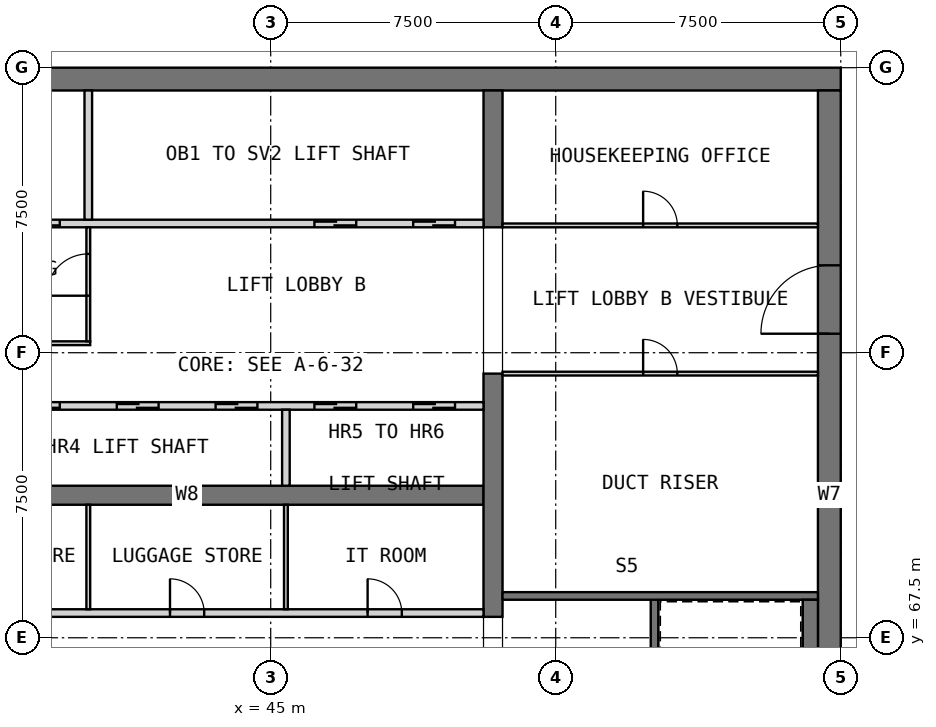
"""IFC4 building model, lengths in metres.
Left out: names, types, materials, properties, quantities, classifications, styles, units other than length and angle.
Written with IfcOpenShell. Run it as: python <this file> out.ifc"""

import sys

from ifc_helpers import new_model, si_unit, direction, frame, frame_2d, origin, place, context, subcontext, project, spatial, rectangle, extrude, element, fill, save


model = new_model("IFC4")
c1 = context("Model", 3, precision=1e-05, world=origin(), true_north=direction((0.0, 1.0)))
c2 = subcontext(c1, "Body", "Model", "MODEL_VIEW")
j1 = project(units=[si_unit("LENGTHUNIT", "METRE"), si_unit("PLANEANGLEUNIT", "RADIAN")], contexts=[c1])
p1 = place(None, origin())
s1 = spatial("IfcSite", under=j1, at=p1, CompositionType="ELEMENT")
p2 = place(p1, origin())
s2 = spatial("IfcBuilding", under=s1, at=p2, CompositionType="ELEMENT")
p3 = place(p2, frame((0.0, 0.0, 254.7)))
s3 = spatial("IfcBuildingStorey", under=s2, at=p3, CompositionType="ELEMENT", Elevation=254.7)
p4 = place(p3, frame((30.0, 82.2, 0.0), z_axis=(0.0, 0.0, 1.0), x_axis=(1.0, 0.0, 0.0)))
e1 = element("IfcWall", 1, at=p4, inside=s3, PredefinedType="SHEAR", context=c2, shape_type="SweptSolid", body=[
    extrude(rectangle(XDim=30.0, YDim=0.6, at=frame_2d((15.0, 0.0))), origin(), (0.0, 0.0, 1.0), 3.5),
])
p5 = place(p3, frame((59.7, 60.6, 0.0), z_axis=(0.0, 0.0, 1.0), x_axis=(0.0, 1.0, 0.0)))
e2 = element("IfcWall", 2, at=p5, inside=s3, PredefinedType="SHEAR", context=c2, shape_type="SweptSolid", body=[
    extrude(rectangle(XDim=21.3, YDim=0.6, at=frame_2d((10.65, 0.0))), origin(), (0.0, 0.0, 1.0), 3.5),
])
p6 = place(p5, frame((14.9, 0.0, 0.0)))
e3 = element("IfcOpeningElement", 3, at=p6, cuts=e2, PredefinedType="OPENING", context=c2, shape_type="SweptSolid", body=[
    extrude(rectangle(XDim=1.8, YDim=2.1, at=frame_2d((0.9, 1.05))), frame((0.0, 0.31, 0.0), z_axis=(0.0, -1.0, 0.0), x_axis=(1.0, 0.0, 0.0)), (0.0, 0.0, 1.0), 0.62),
])
p7 = place(p3, frame((35.0, 71.25, 0.0), z_axis=(0.0, 0.0, 1.0), x_axis=(1.0, 0.0, 0.0)))
e4 = element("IfcWall", 4, at=p7, inside=s3, PredefinedType="SHEAR", context=c2, shape_type="SweptSolid", body=[
    extrude(rectangle(XDim=15.6, YDim=0.5, at=frame_2d((7.8, 0.0))), origin(), (0.0, 0.0, 1.0), 3.5),
])
p8 = place(p3, frame((50.85, 68.05, 0.0), z_axis=(0.0, 0.0, 1.0), x_axis=(0.0, 1.0, 0.0)))
e5 = element("IfcWall", 5, at=p8, inside=s3, PredefinedType="SHEAR", context=c2, shape_type="SweptSolid", body=[
    extrude(rectangle(XDim=6.4, YDim=0.5, at=frame_2d((3.2, 0.0))), origin(), (0.0, 0.0, 1.0), 3.5),
])
p9 = place(p3, frame((50.85, 78.3, 0.0), z_axis=(0.0, 0.0, 1.0), x_axis=(0.0, 1.0, 0.0)))
e6 = element("IfcWall", 6, at=p9, inside=s3, PredefinedType="SHEAR", context=c2, shape_type="SweptSolid", body=[
    extrude(rectangle(XDim=3.6, YDim=0.5, at=frame_2d((1.8, 0.0))), origin(), (0.0, 0.0, 1.0), 3.5),
])
p10 = place(p3, frame((35.0, 68.15, 0.0), z_axis=(0.0, 0.0, 1.0), x_axis=(1.0, 0.0, 0.0)))
e7 = element("IfcWall", 7, at=p10, inside=s3, PredefinedType="PARTITIONING", context=c2, shape_type="SweptSolid", body=[
    extrude(rectangle(XDim=15.6, YDim=0.2, at=frame_2d((7.8, 0.0))), origin(), (0.0, 0.0, 1.0), 3.09),
])
p11 = place(p10, frame((2.15, 0.0, 0.0)))
e8 = element("IfcOpeningElement", 8, at=p11, cuts=e7, PredefinedType="OPENING", context=c2, shape_type="SweptSolid", body=[
    extrude(rectangle(XDim=0.9, YDim=2.1, at=frame_2d((0.45, 1.05))), frame((0.0, 0.11, 0.0), z_axis=(0.0, -1.0, 0.0), x_axis=(1.0, 0.0, 0.0)), (0.0, 0.0, 1.0), 0.22),
])
p12 = place(p10, frame((7.35, 0.0, 0.0)))
e9 = element("IfcOpeningElement", 9, at=p12, cuts=e7, PredefinedType="OPENING", context=c2, shape_type="SweptSolid", body=[
    extrude(rectangle(XDim=0.9, YDim=2.1, at=frame_2d((0.45, 1.05))), frame((0.0, 0.11, 0.0), z_axis=(0.0, -1.0, 0.0), x_axis=(1.0, 0.0, 0.0)), (0.0, 0.0, 1.0), 0.22),
])
p13 = place(p10, frame((12.55, 0.0, 0.0)))
e10 = element("IfcOpeningElement", 10, at=p13, cuts=e7, PredefinedType="OPENING", context=c2, shape_type="SweptSolid", body=[
    extrude(rectangle(XDim=0.9, YDim=2.1, at=frame_2d((0.45, 1.05))), frame((0.0, 0.11, 0.0), z_axis=(0.0, -1.0, 0.0), x_axis=(1.0, 0.0, 0.0)), (0.0, 0.0, 1.0), 0.22),
])
for number, where, z_axis, x_axis in (
    (11, (40.2, 68.25, 0.0), (0.0, 0.0, 1.0), (0.0, 1.0, 0.0)),
    (12, (45.4, 68.25, 0.0), (0.0, 0.0, 1.0), (0.0, 1.0, 0.0)),
):
    element("IfcWall", number, at=place(p3, frame(where, z_axis=z_axis, x_axis=x_axis)), inside=s3, PredefinedType="PARTITIONING", context=c2, shape_type="SweptSolid", body=[
        extrude(rectangle(XDim=2.75, YDim=0.1, at=frame_2d((1.375, 0.0))), origin(), (0.0, 0.0, 1.0), 3.09),
    ])
p14 = place(p3, frame((35.0, 73.6, 0.0), z_axis=(0.0, 0.0, 1.0), x_axis=(1.0, 0.0, 0.0)))
e13 = element("IfcWall", 13, at=p14, inside=s3, PredefinedType="SOLIDWALL", context=c2, shape_type="SweptSolid", body=[
    extrude(rectangle(XDim=15.6, YDim=0.2, at=frame_2d((7.8, 0.0))), origin(), (0.0, 0.0, 1.0), 3.5),
])
p15 = place(p14, frame((0.75, 0.0, 0.0)))
e14 = element("IfcOpeningElement", 14, at=p15, cuts=e13, PredefinedType="OPENING", context=c2, shape_type="SweptSolid", body=[
    extrude(rectangle(XDim=1.1, YDim=2.1, at=frame_2d((0.55, 1.05))), frame((0.0, 0.11, 0.0), z_axis=(0.0, -1.0, 0.0), x_axis=(1.0, 0.0, 0.0)), (0.0, 0.0, 1.0), 0.22),
])
p16 = place(p14, frame((3.35, 0.0, 0.0)))
e15 = element("IfcOpeningElement", 15, at=p16, cuts=e13, PredefinedType="OPENING", context=c2, shape_type="SweptSolid", body=[
    extrude(rectangle(XDim=1.1, YDim=2.1, at=frame_2d((0.55, 1.05))), frame((0.0, 0.11, 0.0), z_axis=(0.0, -1.0, 0.0), x_axis=(1.0, 0.0, 0.0)), (0.0, 0.0, 1.0), 0.22),
])
p17 = place(p14, frame((5.95, 0.0, 0.0)))
e16 = element("IfcOpeningElement", 16, at=p17, cuts=e13, PredefinedType="OPENING", context=c2, shape_type="SweptSolid", body=[
    extrude(rectangle(XDim=1.1, YDim=2.1, at=frame_2d((0.55, 1.05))), frame((0.0, 0.11, 0.0), z_axis=(0.0, -1.0, 0.0), x_axis=(1.0, 0.0, 0.0)), (0.0, 0.0, 1.0), 0.22),
])
p18 = place(p14, frame((8.55, 0.0, 0.0)))
e17 = element("IfcOpeningElement", 17, at=p18, cuts=e13, PredefinedType="OPENING", context=c2, shape_type="SweptSolid", body=[
    extrude(rectangle(XDim=1.1, YDim=2.1, at=frame_2d((0.55, 1.05))), frame((0.0, 0.11, 0.0), z_axis=(0.0, -1.0, 0.0), x_axis=(1.0, 0.0, 0.0)), (0.0, 0.0, 1.0), 0.22),
])
p19 = place(p14, frame((11.15, 0.0, 0.0)))
e18 = element("IfcOpeningElement", 18, at=p19, cuts=e13, PredefinedType="OPENING", context=c2, shape_type="SweptSolid", body=[
    extrude(rectangle(XDim=1.1, YDim=2.1, at=frame_2d((0.55, 1.05))), frame((0.0, 0.11, 0.0), z_axis=(0.0, -1.0, 0.0), x_axis=(1.0, 0.0, 0.0)), (0.0, 0.0, 1.0), 0.22),
])
p20 = place(p14, frame((13.75, 0.0, 0.0)))
e19 = element("IfcOpeningElement", 19, at=p20, cuts=e13, PredefinedType="OPENING", context=c2, shape_type="SweptSolid", body=[
    extrude(rectangle(XDim=1.1, YDim=2.1, at=frame_2d((0.55, 1.05))), frame((0.0, 0.11, 0.0), z_axis=(0.0, -1.0, 0.0), x_axis=(1.0, 0.0, 0.0)), (0.0, 0.0, 1.0), 0.22),
])
p21 = place(p3, frame((45.4, 71.5, 0.0), z_axis=(0.0, 0.0, 1.0), x_axis=(0.0, 1.0, 0.0)))
e20 = element("IfcWall", 20, at=p21, inside=s3, PredefinedType="SOLIDWALL", context=c2, shape_type="SweptSolid", body=[
    extrude(rectangle(XDim=2.0, YDim=0.2, at=frame_2d((1.0, 0.0))), origin(), (0.0, 0.0, 1.0), 3.5),
])
p22 = place(p3, frame((35.0, 78.4, 0.0), z_axis=(0.0, 0.0, 1.0), x_axis=(1.0, 0.0, 0.0)))
e21 = element("IfcWall", 21, at=p22, inside=s3, PredefinedType="SOLIDWALL", context=c2, shape_type="SweptSolid", body=[
    extrude(rectangle(XDim=15.6, YDim=0.2, at=frame_2d((7.8, 0.0))), origin(), (0.0, 0.0, 1.0), 3.5),
])
p23 = place(p22, frame((0.75, 0.0, 0.0)))
e22 = element("IfcOpeningElement", 22, at=p23, cuts=e21, PredefinedType="OPENING", context=c2, shape_type="SweptSolid", body=[
    extrude(rectangle(XDim=1.1, YDim=2.1, at=frame_2d((0.55, 1.05))), frame((0.0, 0.11, 0.0), z_axis=(0.0, -1.0, 0.0), x_axis=(1.0, 0.0, 0.0)), (0.0, 0.0, 1.0), 0.22),
])
p24 = place(p22, frame((3.35, 0.0, 0.0)))
e23 = element("IfcOpeningElement", 23, at=p24, cuts=e21, PredefinedType="OPENING", context=c2, shape_type="SweptSolid", body=[
    extrude(rectangle(XDim=1.1, YDim=2.1, at=frame_2d((0.55, 1.05))), frame((0.0, 0.11, 0.0), z_axis=(0.0, -1.0, 0.0), x_axis=(1.0, 0.0, 0.0)), (0.0, 0.0, 1.0), 0.22),
])
p25 = place(p22, frame((11.15, 0.0, 0.0)))
e24 = element("IfcOpeningElement", 24, at=p25, cuts=e21, PredefinedType="OPENING", context=c2, shape_type="SweptSolid", body=[
    extrude(rectangle(XDim=1.1, YDim=2.1, at=frame_2d((0.55, 1.05))), frame((0.0, 0.11, 0.0), z_axis=(0.0, -1.0, 0.0), x_axis=(1.0, 0.0, 0.0)), (0.0, 0.0, 1.0), 0.22),
])
p26 = place(p22, frame((13.75, 0.0, 0.0)))
e25 = element("IfcOpeningElement", 25, at=p26, cuts=e21, PredefinedType="OPENING", context=c2, shape_type="SweptSolid", body=[
    extrude(rectangle(XDim=1.1, YDim=2.1, at=frame_2d((0.55, 1.05))), frame((0.0, 0.11, 0.0), z_axis=(0.0, -1.0, 0.0), x_axis=(1.0, 0.0, 0.0)), (0.0, 0.0, 1.0), 0.22),
])
p27 = place(p3, frame((40.2, 78.5, 0.0), z_axis=(0.0, 0.0, 1.0), x_axis=(0.0, 1.0, 0.0)))
e26 = element("IfcWall", 26, at=p27, inside=s3, PredefinedType="SOLIDWALL", context=c2, shape_type="SweptSolid", body=[
    extrude(rectangle(XDim=3.4, YDim=0.2, at=frame_2d((1.7, 0.0))), origin(), (0.0, 0.0, 1.0), 3.5),
])
p28 = place(p3, frame((35.0, 75.25, 0.0), z_axis=(0.0, 0.0, 1.0), x_axis=(1.0, 0.0, 0.0)))
e27 = element("IfcWall", 27, at=p28, inside=s3, PredefinedType="PARTITIONING", context=c2, shape_type="SweptSolid", body=[
    extrude(rectangle(XDim=5.25, YDim=0.1, at=frame_2d((2.625, 0.0))), origin(), (0.0, 0.0, 1.0), 3.09),
])
p29 = place(p3, frame((40.2, 75.3, 0.0), z_axis=(0.0, 0.0, 1.0), x_axis=(0.0, 1.0, 0.0)))
e28 = element("IfcWall", 28, at=p29, inside=s3, PredefinedType="PARTITIONING", context=c2, shape_type="SweptSolid", body=[
    extrude(rectangle(XDim=3.0, YDim=0.1, at=frame_2d((1.5, 0.0))), origin(), (0.0, 0.0, 1.0), 3.09),
])
p30 = place(p29, frame((1.2, 0.0, 0.0)))
e29 = element("IfcOpeningElement", 29, at=p30, cuts=e28, PredefinedType="OPENING", context=c2, shape_type="SweptSolid", body=[
    extrude(rectangle(XDim=1.1, YDim=2.1, at=frame_2d((0.55, 1.05))), frame((0.0, 0.06, 0.0), z_axis=(0.0, -1.0, 0.0), x_axis=(1.0, 0.0, 0.0)), (0.0, 0.0, 1.0), 0.12),
])
p31 = place(p3, frame((55.1, 60.6, 0.0), z_axis=(0.0, 0.0, 1.0), x_axis=(0.0, 1.0, 0.0)))
e30 = element("IfcWall", 30, at=p31, inside=s3, PredefinedType="SOLIDWALL", context=c2, shape_type="SweptSolid", body=[
    extrude(rectangle(XDim=8.0, YDim=0.2, at=frame_2d((4.0, 0.0))), origin(), (0.0, 0.0, 1.0), 3.09),
])
p32 = place(p3, frame((51.1, 68.6, 0.0), z_axis=(0.0, 0.0, 1.0), x_axis=(1.0, 0.0, 0.0)))
e31 = element("IfcWall", 31, at=p32, inside=s3, PredefinedType="SOLIDWALL", context=c2, shape_type="SweptSolid", body=[
    extrude(rectangle(XDim=8.3, YDim=0.2, at=frame_2d((4.15, 0.0))), origin(), (0.0, 0.0, 1.0), 3.09),
])
p33 = place(p3, frame((59.2, 60.6, 0.0), z_axis=(0.0, 0.0, 1.0), x_axis=(0.0, 1.0, 0.0)))
e32 = element("IfcWall", 32, at=p33, inside=s3, PredefinedType="SOLIDWALL", context=c2, shape_type="SweptSolid", body=[
    extrude(rectangle(XDim=7.9, YDim=0.4, at=frame_2d((3.95, 0.0))), origin(), (0.0, 0.0, 1.0), 3.09),
])
p34 = place(p3, frame((51.1, 74.45, 0.0), z_axis=(0.0, 0.0, 1.0), x_axis=(1.0, 0.0, 0.0)))
e33 = element("IfcWall", 33, at=p34, inside=s3, PredefinedType="PARTITIONING", context=c2, shape_type="SweptSolid", body=[
    extrude(rectangle(XDim=8.3, YDim=0.1, at=frame_2d((4.15, 0.0))), origin(), (0.0, 0.0, 1.0), 3.09),
])
p35 = place(p34, frame((3.7, 0.0, 0.0)))
e34 = element("IfcOpeningElement", 34, at=p35, cuts=e33, PredefinedType="OPENING", context=c2, shape_type="SweptSolid", body=[
    extrude(rectangle(XDim=0.9, YDim=2.1, at=frame_2d((0.45, 1.05))), frame((0.0, 0.06, 0.0), z_axis=(0.0, -1.0, 0.0), x_axis=(1.0, 0.0, 0.0)), (0.0, 0.0, 1.0), 0.12),
])
p36 = place(p3, frame((51.1, 78.35, 0.0), z_axis=(0.0, 0.0, 1.0), x_axis=(1.0, 0.0, 0.0)))
e35 = element("IfcWall", 35, at=p36, inside=s3, PredefinedType="PARTITIONING", context=c2, shape_type="SweptSolid", body=[
    extrude(rectangle(XDim=8.3, YDim=0.1, at=frame_2d((4.15, 0.0))), origin(), (0.0, 0.0, 1.0), 3.09),
])
p37 = place(p36, frame((3.7, 0.0, 0.0)))
e36 = element("IfcOpeningElement", 36, at=p37, cuts=e35, PredefinedType="OPENING", context=c2, shape_type="SweptSolid", body=[
    extrude(rectangle(XDim=0.9, YDim=2.1, at=frame_2d((0.45, 1.05))), frame((0.0, 0.06, 0.0), z_axis=(0.0, -1.0, 0.0), x_axis=(1.0, 0.0, 0.0)), (0.0, 0.0, 1.0), 0.12),
])
p38 = place(p12, origin())
e37 = element("IfcDoor", 37, at=p38, inside=s3, OperationType="SINGLE_SWING_LEFT", PredefinedType="DOOR", context=c2, shape_type="SweptSolid", body=[
    extrude(rectangle(XDim=0.9, YDim=2.1, at=frame_2d((0.45, 1.05))), frame((0.0, 0.025, 0.0), z_axis=(0.0, -1.0, 0.0), x_axis=(1.0, 0.0, 0.0)), (0.0, 0.0, 1.0), 0.05),
])
fill(e9, e37)
p39 = place(p13, origin())
e38 = element("IfcDoor", 38, at=p39, inside=s3, OperationType="SINGLE_SWING_RIGHT", PredefinedType="DOOR", context=c2, shape_type="SweptSolid", body=[
    extrude(rectangle(XDim=0.9, YDim=2.1, at=frame_2d((0.45, 1.05))), frame((0.0, 0.025, 0.0), z_axis=(0.0, -1.0, 0.0), x_axis=(1.0, 0.0, 0.0)), (0.0, 0.0, 1.0), 0.05),
])
fill(e10, e38)
p40 = place(p16, origin())
e39 = element("IfcDoor", 39, at=p40, inside=s3, OperationType="DOUBLE_DOOR_SLIDING", PredefinedType="DOOR", context=c2, shape_type="SweptSolid", body=[
    extrude(rectangle(XDim=1.1, YDim=2.1, at=frame_2d((0.55, 1.05))), frame((0.0, 0.025, 0.0), z_axis=(0.0, -1.0, 0.0), x_axis=(1.0, 0.0, 0.0)), (0.0, 0.0, 1.0), 0.05),
])
fill(e15, e39)
p41 = place(p17, origin())
e40 = element("IfcDoor", 40, at=p41, inside=s3, OperationType="DOUBLE_DOOR_SLIDING", PredefinedType="DOOR", context=c2, shape_type="SweptSolid", body=[
    extrude(rectangle(XDim=1.1, YDim=2.1, at=frame_2d((0.55, 1.05))), frame((0.0, 0.025, 0.0), z_axis=(0.0, -1.0, 0.0), x_axis=(1.0, 0.0, 0.0)), (0.0, 0.0, 1.0), 0.05),
])
fill(e16, e40)
p42 = place(p18, origin())
e41 = element("IfcDoor", 41, at=p42, inside=s3, OperationType="DOUBLE_DOOR_SLIDING", PredefinedType="DOOR", context=c2, shape_type="SweptSolid", body=[
    extrude(rectangle(XDim=1.1, YDim=2.1, at=frame_2d((0.55, 1.05))), frame((0.0, 0.025, 0.0), z_axis=(0.0, -1.0, 0.0), x_axis=(1.0, 0.0, 0.0)), (0.0, 0.0, 1.0), 0.05),
])
fill(e17, e41)
p43 = place(p19, origin())
e42 = element("IfcDoor", 42, at=p43, inside=s3, OperationType="DOUBLE_DOOR_SLIDING", PredefinedType="DOOR", context=c2, shape_type="SweptSolid", body=[
    extrude(rectangle(XDim=1.1, YDim=2.1, at=frame_2d((0.55, 1.05))), frame((0.0, 0.025, 0.0), z_axis=(0.0, -1.0, 0.0), x_axis=(1.0, 0.0, 0.0)), (0.0, 0.0, 1.0), 0.05),
])
fill(e18, e42)
p44 = place(p20, origin())
e43 = element("IfcDoor", 43, at=p44, inside=s3, OperationType="DOUBLE_DOOR_SLIDING", PredefinedType="DOOR", context=c2, shape_type="SweptSolid", body=[
    extrude(rectangle(XDim=1.1, YDim=2.1, at=frame_2d((0.55, 1.05))), frame((0.0, 0.025, 0.0), z_axis=(0.0, -1.0, 0.0), x_axis=(1.0, 0.0, 0.0)), (0.0, 0.0, 1.0), 0.05),
])
fill(e19, e43)
p45 = place(p24, origin())
e44 = element("IfcDoor", 44, at=p45, inside=s3, OperationType="DOUBLE_DOOR_SLIDING", PredefinedType="DOOR", context=c2, shape_type="SweptSolid", body=[
    extrude(rectangle(XDim=1.1, YDim=2.1, at=frame_2d((0.55, 1.05))), frame((0.0, 0.025, 0.0), z_axis=(0.0, -1.0, 0.0), x_axis=(1.0, 0.0, 0.0)), (0.0, 0.0, 1.0), 0.05),
])
fill(e23, e44)
p46 = place(p25, origin())
e45 = element("IfcDoor", 45, at=p46, inside=s3, OperationType="DOUBLE_DOOR_SLIDING", PredefinedType="DOOR", context=c2, shape_type="SweptSolid", body=[
    extrude(rectangle(XDim=1.1, YDim=2.1, at=frame_2d((0.55, 1.05))), frame((0.0, 0.025, 0.0), z_axis=(0.0, -1.0, 0.0), x_axis=(1.0, 0.0, 0.0)), (0.0, 0.0, 1.0), 0.05),
])
fill(e24, e45)
p47 = place(p26, origin())
e46 = element("IfcDoor", 46, at=p47, inside=s3, OperationType="DOUBLE_DOOR_SLIDING", PredefinedType="DOOR", context=c2, shape_type="SweptSolid", body=[
    extrude(rectangle(XDim=1.1, YDim=2.1, at=frame_2d((0.55, 1.05))), frame((0.0, 0.025, 0.0), z_axis=(0.0, -1.0, 0.0), x_axis=(1.0, 0.0, 0.0)), (0.0, 0.0, 1.0), 0.05),
])
fill(e25, e46)
p48 = place(p6, origin())
e47 = element("IfcDoor", 47, at=p48, inside=s3, OperationType="DOUBLE_DOOR_SINGLE_SWING", PredefinedType="DOOR", context=c2, shape_type="SweptSolid", body=[
    extrude(rectangle(XDim=1.8, YDim=2.1, at=frame_2d((0.9, 1.05))), frame((0.0, 0.025, 0.0), z_axis=(0.0, -1.0, 0.0), x_axis=(1.0, 0.0, 0.0)), (0.0, 0.0, 1.0), 0.05),
])
fill(e3, e47)
p49 = place(p30, origin())
e48 = element("IfcDoor", 48, at=p49, inside=s3, OperationType="SINGLE_SWING_LEFT", PredefinedType="DOOR", context=c2, shape_type="SweptSolid", body=[
    extrude(rectangle(XDim=1.1, YDim=2.1, at=frame_2d((0.55, 1.05))), frame((0.0, 0.025, 0.0), z_axis=(0.0, -1.0, 0.0), x_axis=(1.0, 0.0, 0.0)), (0.0, 0.0, 1.0), 0.05),
])
fill(e29, e48)
p50 = place(p35, origin())
e49 = element("IfcDoor", 49, at=p50, inside=s3, OperationType="SINGLE_SWING_RIGHT", PredefinedType="DOOR", context=c2, shape_type="SweptSolid", body=[
    extrude(rectangle(XDim=0.9, YDim=2.1, at=frame_2d((0.45, 1.05))), frame((0.0, 0.025, 0.0), z_axis=(0.0, -1.0, 0.0), x_axis=(1.0, 0.0, 0.0)), (0.0, 0.0, 1.0), 0.05),
])
fill(e34, e49)
p51 = place(p37, origin())
e50 = element("IfcDoor", 50, at=p51, inside=s3, OperationType="SINGLE_SWING_RIGHT", PredefinedType="DOOR", context=c2, shape_type="SweptSolid", body=[
    extrude(rectangle(XDim=0.9, YDim=2.1, at=frame_2d((0.45, 1.05))), frame((0.0, 0.025, 0.0), z_axis=(0.0, -1.0, 0.0), x_axis=(1.0, 0.0, 0.0)), (0.0, 0.0, 1.0), 0.05),
])
fill(e36, e50)
save(model, sys.argv[1])
